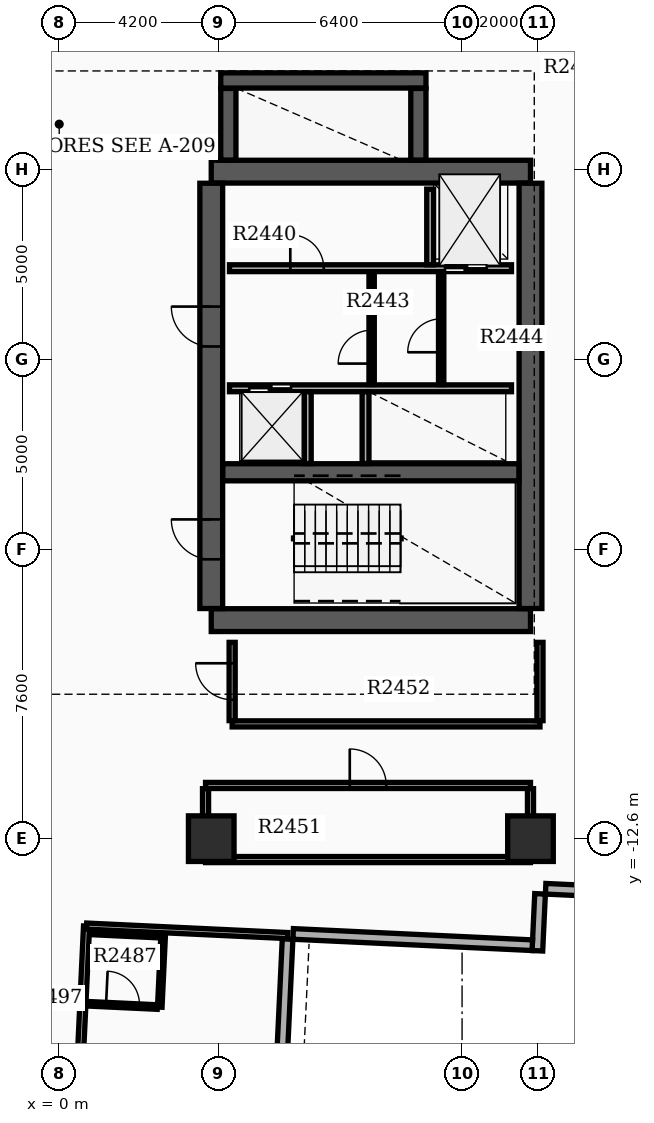
"""IFC4 building model, lengths in metres.
Left out: names, types, materials, properties, quantities, classifications, styles, units other than length and angle.
Written with IfcOpenShell. Run it as: python <this file> out.ifc"""

import sys

from ifc_helpers import new_model, si_unit, direction, frame, frame_2d, origin, origin_2d, place, context, subcontext, project, spatial, rectangle, extrude, element, fill, save


model = new_model("IFC4")
c1 = context("Model", 3, precision=1e-05, world=origin(), true_north=direction((0.0, 1.0)))
c2 = subcontext(c1, "Body", "Model", "MODEL_VIEW")
j1 = project(units=[si_unit("LENGTHUNIT", "METRE"), si_unit("PLANEANGLEUNIT", "RADIAN")], contexts=[c1])
p1 = place(None, origin())
s1 = spatial("IfcSite", under=j1, at=p1, CompositionType="ELEMENT")
p2 = place(p1, origin())
s2 = spatial("IfcBuilding", under=s1, at=p2, CompositionType="ELEMENT")
p3 = place(p2, frame((0.0, 0.0, 156.6)))
s3 = spatial("IfcBuildingStorey", under=s2, at=p3, CompositionType="ELEMENT", Elevation=156.6)
for number, where, z_axis, x_axis in (
    (1, (4.0, -6.85, 0.0), (0.0, 0.0, 1.0), (1.0, 0.0, 0.0)),
    (2, (4.0, 4.95, 0.0), (0.0, 0.0, 1.0), (1.0, 0.0, 0.0)),
):
    element("IfcWall", number, at=place(p3, frame(where, z_axis=z_axis, x_axis=x_axis)), inside=s3, PredefinedType="SHEAR", context=c2, shape_type="SweptSolid", body=[
        extrude(rectangle(XDim=8.4, YDim=0.6, at=frame_2d((4.2, 0.0))), origin(), (0.0, 0.0, 1.0), 3.7),
    ])
p4 = place(p3, frame((4.0, -6.545, 0.0), z_axis=(0.0, 0.0, 1.0), x_axis=(0.0, 1.0, 0.0)))
e3 = element("IfcWall", 3, at=p4, inside=s3, PredefinedType="SHEAR", context=c2, shape_type="SweptSolid", body=[
    extrude(rectangle(XDim=11.19, YDim=0.6, at=frame_2d((5.595, 0.0))), origin(), (0.0, 0.0, 1.0), 3.7),
])
p5 = place(p4, frame((1.295, 0.0, 0.0)))
e4 = element("IfcOpeningElement", 4, at=p5, cuts=e3, PredefinedType="OPENING", context=c2, shape_type="SweptSolid", body=[
    extrude(rectangle(XDim=1.05, YDim=2.15, at=frame_2d((0.525, 1.075))), frame((0.0, 0.31, 0.0), z_axis=(0.0, -1.0, 0.0), x_axis=(1.0, 0.0, 0.0)), (0.0, 0.0, 1.0), 0.62),
])
p6 = place(p4, frame((6.895, 0.0, 0.0)))
e5 = element("IfcOpeningElement", 5, at=p6, cuts=e3, PredefinedType="OPENING", context=c2, shape_type="SweptSolid", body=[
    extrude(rectangle(XDim=1.05, YDim=2.15, at=frame_2d((0.525, 1.075))), frame((0.0, 0.31, 0.0), z_axis=(0.0, -1.0, 0.0), x_axis=(1.0, 0.0, 0.0)), (0.0, 0.0, 1.0), 0.62),
])
p7 = place(p3, frame((12.4, -6.545, 0.0), z_axis=(0.0, 0.0, 1.0), x_axis=(0.0, 1.0, 0.0)))
e6 = element("IfcWall", 6, at=p7, inside=s3, PredefinedType="SHEAR", context=c2, shape_type="SweptSolid", body=[
    extrude(rectangle(XDim=11.19, YDim=0.6, at=frame_2d((5.595, 0.0))), origin(), (0.0, 0.0, 1.0), 3.7),
])
p8 = place(p3, frame((4.305, -2.96, 0.0), z_axis=(0.0, 0.0, 1.0), x_axis=(1.0, 0.0, 0.0)))
e7 = element("IfcWall", 7, at=p8, inside=s3, PredefinedType="SHEAR", context=c2, shape_type="SweptSolid", body=[
    extrude(rectangle(XDim=7.79, YDim=0.45, at=frame_2d((3.895, 0.0))), origin(), (0.0, 0.0, 1.0), 3.7),
])
p9 = place(p3, frame((4.45, 5.255, 0.0), z_axis=(0.0, 0.0, 1.0), x_axis=(0.0, 1.0, 0.0)))
e8 = element("IfcWall", 8, at=p9, inside=s3, PredefinedType="SHEAR", context=c2, shape_type="SweptSolid", body=[
    extrude(rectangle(XDim=1.885, YDim=0.4, at=frame_2d((0.942, 0.0))), origin(), (0.0, 0.0, 1.0), 3.7),
])
p10 = place(p3, frame((4.25, 7.35, 0.0), z_axis=(0.0, 0.0, 1.0), x_axis=(1.0, 0.0, 0.0)))
e9 = element("IfcWall", 9, at=p10, inside=s3, PredefinedType="SHEAR", context=c2, shape_type="SweptSolid", body=[
    extrude(rectangle(XDim=5.4, YDim=0.4, at=frame_2d((2.7, 0.0))), origin(), (0.0, 0.0, 1.0), 3.7),
])
p11 = place(p3, frame((9.45, 5.255, 0.0), z_axis=(0.0, 0.0, 1.0), x_axis=(0.0, 1.0, 0.0)))
e10 = element("IfcWall", 10, at=p11, inside=s3, PredefinedType="SHEAR", context=c2, shape_type="SweptSolid", body=[
    extrude(rectangle(XDim=1.885, YDim=0.4, at=frame_2d((0.942, 0.0))), origin(), (0.0, 0.0, 1.0), 3.7),
])
for number, where, z_axis, x_axis in (
    (11, (12.4, -12.6, 0.0), (0.0, 0.0, 1.0), (1.0, 0.0, 0.0)),
    (12, (4.0, -12.6, 0.0), (0.0, 0.0, 1.0), (1.0, 0.0, 0.0)),
):
    element("IfcColumn", number, at=place(p3, frame(where, z_axis=z_axis, x_axis=x_axis)), inside=s3, PredefinedType="COLUMN", context=c2, shape_type="SweptSolid", body=[
        extrude(rectangle(XDim=1.2, YDim=1.2, at=origin_2d()), origin(), (0.0, 0.0, 1.0), 3.9),
    ])
p12 = place(p3, frame((5.062, -35.318, 0.0), z_axis=(0.0, 0.0, 1.0), x_axis=(0.047103473814, 0.998890015344, 0.0)))
e13 = element("IfcWall", 13, at=p12, inside=s3, PredefinedType="STANDARD", context=c2, shape_type="SweptSolid", body=[
    extrude(rectangle(XDim=20.1, YDim=0.28, at=frame_2d((10.05, 0.0))), origin(), (0.0, 0.0, 1.0), 2.97),
])
p13 = place(p12, frame((1.6, 0.0, 0.8)))
e14 = element("IfcOpeningElement", 14, at=p13, cuts=e13, PredefinedType="OPENING", context=c2, shape_type="SweptSolid", body=[
    extrude(rectangle(XDim=1.2, YDim=1.6, at=frame_2d((0.6, 0.8))), frame((0.0, 0.15, 0.0), z_axis=(0.0, -1.0, 0.0), x_axis=(1.0, 0.0, 0.0)), (0.0, 0.0, 1.0), 0.3),
])
p14 = place(p12, frame((4.8, 0.0, 0.8)))
e15 = element("IfcOpeningElement", 15, at=p14, cuts=e13, PredefinedType="OPENING", context=c2, shape_type="SweptSolid", body=[
    extrude(rectangle(XDim=1.2, YDim=1.6, at=frame_2d((0.6, 0.8))), frame((0.0, 0.15, 0.0), z_axis=(0.0, -1.0, 0.0), x_axis=(1.0, 0.0, 0.0)), (0.0, 0.0, 1.0), 0.3),
])
p15 = place(p12, frame((8.0, 0.0, 0.8)))
e16 = element("IfcOpeningElement", 16, at=p15, cuts=e13, PredefinedType="OPENING", context=c2, shape_type="SweptSolid", body=[
    extrude(rectangle(XDim=1.2, YDim=1.6, at=frame_2d((0.6, 0.8))), frame((0.0, 0.15, 0.0), z_axis=(0.0, -1.0, 0.0), x_axis=(1.0, 0.0, 0.0)), (0.0, 0.0, 1.0), 0.3),
])
p16 = place(p12, frame((11.2, 0.0, 0.8)))
e17 = element("IfcOpeningElement", 17, at=p16, cuts=e13, PredefinedType="OPENING", context=c2, shape_type="SweptSolid", body=[
    extrude(rectangle(XDim=1.2, YDim=1.6, at=frame_2d((0.6, 0.8))), frame((0.0, 0.15, 0.0), z_axis=(0.0, -1.0, 0.0), x_axis=(1.0, 0.0, 0.0)), (0.0, 0.0, 1.0), 0.3),
])
p17 = place(p3, frame((14.017, -13.976, 0.0), z_axis=(0.0, 0.0, 1.0), x_axis=(-0.998883930236, 0.047232339719, 0.0)))
e18 = element("IfcWall", 18, at=p17, inside=s3, PredefinedType="STANDARD", context=c2, shape_type="SweptSolid", body=[
    extrude(rectangle(XDim=1.22, YDim=0.28, at=frame_2d((0.61, 0.0))), origin(), (0.0, 0.0, 1.0), 2.97),
])
p18 = place(p3, frame((12.652, -14.052, 0.0), z_axis=(0.0, 0.0, 1.0), x_axis=(-0.047039284441, -0.99889304018, 0.0)))
e19 = element("IfcWall", 19, at=p18, inside=s3, PredefinedType="STANDARD", context=c2, shape_type="SweptSolid", body=[
    extrude(rectangle(XDim=1.5, YDim=0.28, at=frame_2d((0.75, 0.0))), origin(), (0.0, 0.0, 1.0), 2.97),
])
p19 = place(p3, frame((12.448, -15.404, 0.0), z_axis=(0.0, 0.0, 1.0), x_axis=(-0.998889082162, 0.047123258997, 0.0)))
e20 = element("IfcWall", 20, at=p19, inside=s3, PredefinedType="STANDARD", context=c2, shape_type="SweptSolid", body=[
    extrude(rectangle(XDim=6.3, YDim=0.28, at=frame_2d((3.15, 0.0))), origin(), (0.0, 0.0, 1.0), 2.97),
])
p20 = place(p3, frame((4.48, 2.41, 0.0), z_axis=(0.0, 0.0, 1.0), x_axis=(1.0, 0.0, 0.0)))
e21 = element("IfcWall", 21, at=p20, inside=s3, PredefinedType="SOLIDWALL", context=c2, shape_type="SweptSolid", body=[
    extrude(rectangle(XDim=7.42, YDim=0.18, at=frame_2d((3.71, 0.0))), origin(), (0.0, 0.0, 1.0), 2.96),
])
p21 = place(p20, frame((5.67, 0.0, 0.0)))
e22 = element("IfcOpeningElement", 22, at=p21, cuts=e21, PredefinedType="OPENING", context=c2, shape_type="SweptSolid", body=[
    extrude(rectangle(XDim=1.1, YDim=2.15, at=frame_2d((0.55, 1.075))), frame((0.0, 0.1, 0.0), z_axis=(0.0, -1.0, 0.0), x_axis=(1.0, 0.0, 0.0)), (0.0, 0.0, 1.0), 0.2),
])
p22 = place(p20, frame((1.6, 0.0, 0.0)))
e23 = element("IfcOpeningElement", 23, at=p22, cuts=e21, PredefinedType="OPENING", context=c2, shape_type="SweptSolid", body=[
    extrude(rectangle(XDim=0.88, YDim=2.1, at=frame_2d((0.44, 1.05))), frame((0.0, 0.1, 0.0), z_axis=(0.0, -1.0, 0.0), x_axis=(1.0, 0.0, 0.0)), (0.0, 0.0, 1.0), 0.2),
])
p23 = place(p3, frame((4.48, -0.75, 0.0), z_axis=(0.0, 0.0, 1.0), x_axis=(1.0, 0.0, 0.0)))
e24 = element("IfcWall", 24, at=p23, inside=s3, PredefinedType="SOLIDWALL", context=c2, shape_type="SweptSolid", body=[
    extrude(rectangle(XDim=7.42, YDim=0.18, at=frame_2d((3.71, 0.0))), origin(), (0.0, 0.0, 1.0), 2.96),
])
p24 = place(p23, frame((0.52, 0.0, 0.0)))
e25 = element("IfcOpeningElement", 25, at=p24, cuts=e24, PredefinedType="OPENING", context=c2, shape_type="SweptSolid", body=[
    extrude(rectangle(XDim=1.1, YDim=2.15, at=frame_2d((0.55, 1.075))), frame((0.0, 0.1, 0.0), z_axis=(0.0, -1.0, 0.0), x_axis=(1.0, 0.0, 0.0)), (0.0, 0.0, 1.0), 0.2),
])
p25 = place(p3, frame((9.76, 2.5, 0.0), z_axis=(0.0, 0.0, 1.0), x_axis=(0.0, 1.0, 0.0)))
e26 = element("IfcWall", 26, at=p25, inside=s3, PredefinedType="SOLIDWALL", context=c2, shape_type="SweptSolid", body=[
    extrude(rectangle(XDim=1.99, YDim=0.18, at=frame_2d((0.995, 0.0))), origin(), (0.0, 0.0, 1.0), 2.96),
])
for number, where, z_axis, x_axis in (
    (27, (6.54, -2.73, 0.0), (0.0, 0.0, 1.0), (0.0, 1.0, 0.0)),
    (28, (8.06, -2.73, 0.0), (0.0, 0.0, 1.0), (0.0, 1.0, 0.0)),
):
    element("IfcWall", number, at=place(p3, frame(where, z_axis=z_axis, x_axis=x_axis)), inside=s3, PredefinedType="SOLIDWALL", context=c2, shape_type="SweptSolid", body=[
        extrude(rectangle(XDim=1.89, YDim=0.18, at=frame_2d((0.945, 0.0))), origin(), (0.0, 0.0, 1.0), 2.96),
    ])
p26 = place(p3, frame((8.22, -0.65, 0.0), z_axis=(0.0, 0.0, 1.0), x_axis=(0.0, 1.0, 0.0)))
e29 = element("IfcWall", 29, at=p26, inside=s3, PredefinedType="SOLIDWALL", context=c2, shape_type="SweptSolid", body=[
    extrude(rectangle(XDim=2.96, YDim=0.14, at=frame_2d((1.48, 0.0))), origin(), (0.0, 0.0, 1.0), 2.96),
])
p27 = place(p26, frame((0.55, 0.0, 0.0)))
e30 = element("IfcOpeningElement", 30, at=p27, cuts=e29, PredefinedType="OPENING", context=c2, shape_type="SweptSolid", body=[
    extrude(rectangle(XDim=0.88, YDim=2.1, at=frame_2d((0.44, 1.05))), frame((0.0, 0.08, 0.0), z_axis=(0.0, -1.0, 0.0), x_axis=(1.0, 0.0, 0.0)), (0.0, 0.0, 1.0), 0.16),
])
p28 = place(p3, frame((10.05, -0.652, 0.0), z_axis=(0.0, 0.0, 1.0), x_axis=(0.0, 1.0, 0.0)))
e31 = element("IfcWall", 31, at=p28, inside=s3, PredefinedType="PARTITIONING", context=c2, shape_type="SweptSolid", body=[
    extrude(rectangle(XDim=2.962, YDim=0.14, at=frame_2d((1.481, 0.0))), origin(), (0.0, 0.0, 1.0), 2.96),
])
p29 = place(p28, frame((0.85, 0.0, 0.0)))
e32 = element("IfcOpeningElement", 32, at=p29, cuts=e31, PredefinedType="OPENING", context=c2, shape_type="SweptSolid", body=[
    extrude(rectangle(XDim=0.88, YDim=2.1, at=frame_2d((0.44, 1.05))), frame((0.0, 0.08, 0.0), z_axis=(0.0, -1.0, 0.0), x_axis=(1.0, 0.0, 0.0)), (0.0, 0.0, 1.0), 0.16),
])
p30 = place(p3, frame((3.85, -13.15, 0.0), z_axis=(0.0, 0.0, 1.0), x_axis=(1.0, 0.0, 0.0)))
e33 = element("IfcWall", 33, at=p30, inside=s3, PredefinedType="PARTITIONING", context=c2, shape_type="SweptSolid", body=[
    extrude(rectangle(XDim=8.55, YDim=0.16, at=frame_2d((4.275, 0.0))), origin(), (0.0, 0.0, 1.0), 2.96),
])
p31 = place(p3, frame((3.85, -11.2, 0.0), z_axis=(0.0, 0.0, 1.0), x_axis=(1.0, 0.0, 0.0)))
e34 = element("IfcWall", 34, at=p31, inside=s3, PredefinedType="PARTITIONING", context=c2, shape_type="SweptSolid", body=[
    extrude(rectangle(XDim=8.55, YDim=0.16, at=frame_2d((4.275, 0.0))), origin(), (0.0, 0.0, 1.0), 2.96),
])
p32 = place(p31, frame((3.795, 0.0, 0.0)))
e35 = element("IfcOpeningElement", 35, at=p32, cuts=e34, PredefinedType="OPENING", context=c2, shape_type="SweptSolid", body=[
    extrude(rectangle(XDim=0.96, YDim=2.15, at=frame_2d((0.48, 1.075))), frame((0.0, 0.09, 0.0), z_axis=(0.0, -1.0, 0.0), x_axis=(1.0, 0.0, 0.0)), (0.0, 0.0, 1.0), 0.18),
])
for number, where, z_axis, x_axis in (
    (36, (3.85, -13.065, 0.0), (0.0, 0.0, 1.0), (0.0, 1.0, 0.0)),
    (37, (12.4, -13.065, 0.0), (0.0, 0.0, 1.0), (0.0, 1.0, 0.0)),
):
    element("IfcWall", number, at=place(p3, frame(where, z_axis=z_axis, x_axis=x_axis)), inside=s3, PredefinedType="PARTITIONING", context=c2, shape_type="SweptSolid", body=[
        extrude(rectangle(XDim=1.78, YDim=0.16, at=frame_2d((0.89, 0.0))), origin(), (0.0, 0.0, 1.0), 2.96),
    ])
p33 = place(p3, frame((4.55, -9.58, 0.0), z_axis=(0.0, 0.0, 1.0), x_axis=(1.0, 0.0, 0.0)))
e38 = element("IfcWall", 38, at=p33, inside=s3, PredefinedType="PARTITIONING", context=c2, shape_type="SweptSolid", body=[
    extrude(rectangle(XDim=8.1, YDim=0.16, at=frame_2d((4.05, 0.0))), origin(), (0.0, 0.0, 1.0), 2.96),
])
p34 = place(p3, frame((4.55, -9.495, 0.0), z_axis=(0.0, 0.0, 1.0), x_axis=(0.0, 1.0, 0.0)))
e39 = element("IfcWall", 39, at=p34, inside=s3, PredefinedType="PARTITIONING", context=c2, shape_type="SweptSolid", body=[
    extrude(rectangle(XDim=2.06, YDim=0.16, at=frame_2d((1.03, 0.0))), origin(), (0.0, 0.0, 1.0), 2.96),
])
p35 = place(p34, frame((0.55, 0.0, 0.0)))
e40 = element("IfcOpeningElement", 40, at=p35, cuts=e39, PredefinedType="OPENING", context=c2, shape_type="SweptSolid", body=[
    extrude(rectangle(XDim=0.96, YDim=2.15, at=frame_2d((0.48, 1.075))), frame((0.0, 0.09, 0.0), z_axis=(0.0, -1.0, 0.0), x_axis=(1.0, 0.0, 0.0)), (0.0, 0.0, 1.0), 0.18),
])
p36 = place(p3, frame((12.65, -9.495, 0.0), z_axis=(0.0, 0.0, 1.0), x_axis=(0.0, 1.0, 0.0)))
e41 = element("IfcWall", 41, at=p36, inside=s3, PredefinedType="PARTITIONING", context=c2, shape_type="SweptSolid", body=[
    extrude(rectangle(XDim=2.06, YDim=0.16, at=frame_2d((1.03, 0.0))), origin(), (0.0, 0.0, 1.0), 2.96),
])
p37 = place(p3, frame((0.719, -14.9, 0.0), z_axis=(0.0, 0.0, 1.0), x_axis=(-0.047105352469, -0.998889926753, 0.0)))
e42 = element("IfcWall", 42, at=p37, inside=s3, PredefinedType="PARTITIONING", context=c2, shape_type="SweptSolid", body=[
    extrude(rectangle(XDim=20.182, YDim=0.16, at=frame_2d((10.091, 0.0))), origin(), (0.0, 0.0, 1.0), 2.96),
])
p38 = place(p37, frame((8.212, 0.0, 0.0)))
e43 = element("IfcOpeningElement", 43, at=p38, cuts=e42, PredefinedType="OPENING", context=c2, shape_type="SweptSolid", body=[
    extrude(rectangle(XDim=0.96, YDim=2.15, at=frame_2d((0.48, 1.075))), frame((0.0, 0.09, 0.0), z_axis=(0.0, -1.0, 0.0), x_axis=(1.0, 0.0, 0.0)), (0.0, 0.0, 1.0), 0.18),
])
p39 = place(p37, frame((16.261, 0.0, 0.0)))
e44 = element("IfcOpeningElement", 44, at=p39, cuts=e42, PredefinedType="OPENING", context=c2, shape_type="SweptSolid", body=[
    extrude(rectangle(XDim=0.96, YDim=2.15, at=frame_2d((0.48, 1.075))), frame((0.0, 0.09, 0.0), z_axis=(0.0, -1.0, 0.0), x_axis=(1.0, 0.0, 0.0)), (0.0, 0.0, 1.0), 0.18),
])
p40 = place(p3, frame((0.719, -14.9, 0.0), z_axis=(0.0, 0.0, 1.0), x_axis=(0.998888989288, -0.047125227635, 0.0)))
e45 = element("IfcWall", 45, at=p40, inside=s3, PredefinedType="PARTITIONING", context=c2, shape_type="SweptSolid", body=[
    extrude(rectangle(XDim=5.3, YDim=0.16, at=frame_2d((2.65, 0.0))), origin(), (0.0, 0.0, 1.0), 2.96),
])
p41 = place(p3, frame((0.763, -16.945, 0.0), z_axis=(0.0, 0.0, 1.0), x_axis=(0.998884467853, -0.047220968666, 0.0)))
e46 = element("IfcWall", 46, at=p41, inside=s3, PredefinedType="PARTITIONING", context=c2, shape_type="SweptSolid", body=[
    extrude(rectangle(XDim=1.82, YDim=0.12, at=frame_2d((0.91, 0.0))), origin(), (0.0, 0.0, 1.0), 2.96),
])
p42 = place(p41, frame((0.47, 0.0, 0.0)))
e47 = element("IfcOpeningElement", 47, at=p42, cuts=e46, PredefinedType="OPENING", context=c2, shape_type="SweptSolid", body=[
    extrude(rectangle(XDim=0.88, YDim=2.1, at=frame_2d((0.44, 1.05))), frame((0.0, 0.07, 0.0), z_axis=(0.0, -1.0, 0.0), x_axis=(1.0, 0.0, 0.0)), (0.0, 0.0, 1.0), 0.14),
])
p43 = place(p3, frame((0.851, -15.067, 0.0), z_axis=(0.0, 0.0, 1.0), x_axis=(0.998890786574, -0.047087116047, 0.0)))
e48 = element("IfcWall", 48, at=p43, inside=s3, PredefinedType="PARTITIONING", context=c2, shape_type="SweptSolid", body=[
    extrude(rectangle(XDim=1.82, YDim=0.12, at=frame_2d((0.91, 0.0))), origin(), (0.0, 0.0, 1.0), 2.96),
])
p44 = place(p3, frame((2.734, -15.156, 0.0), z_axis=(0.0, 0.0, 1.0), x_axis=(-0.047139425368, -0.998888319371, 0.0)))
e49 = element("IfcWall", 49, at=p44, inside=s3, PredefinedType="PARTITIONING", context=c2, shape_type="SweptSolid", body=[
    extrude(rectangle(XDim=1.88, YDim=0.12, at=frame_2d((0.94, 0.0))), origin(), (0.0, 0.0, 1.0), 2.96),
])
p45 = place(p5, origin())
e50 = element("IfcDoor", 50, at=p45, inside=s3, OperationType="SINGLE_SWING_RIGHT", PredefinedType="DOOR", context=c2, shape_type="SweptSolid", body=[
    extrude(rectangle(XDim=1.05, YDim=2.15, at=frame_2d((0.525, 1.075))), frame((0.0, 0.025, 0.0), z_axis=(0.0, -1.0, 0.0), x_axis=(1.0, 0.0, 0.0)), (0.0, 0.0, 1.0), 0.05),
])
fill(e4, e50)
p46 = place(p6, origin())
e51 = element("IfcDoor", 51, at=p46, inside=s3, OperationType="SINGLE_SWING_RIGHT", PredefinedType="DOOR", context=c2, shape_type="SweptSolid", body=[
    extrude(rectangle(XDim=1.05, YDim=2.15, at=frame_2d((0.525, 1.075))), frame((0.0, 0.025, 0.0), z_axis=(0.0, -1.0, 0.0), x_axis=(1.0, 0.0, 0.0)), (0.0, 0.0, 1.0), 0.05),
])
fill(e5, e51)
p47 = place(p21, origin())
e52 = element("IfcDoor", 52, at=p47, inside=s3, OperationType="DOUBLE_DOOR_SLIDING", PredefinedType="DOOR", context=c2, shape_type="SweptSolid", body=[
    extrude(rectangle(XDim=1.1, YDim=2.15, at=frame_2d((0.55, 1.075))), frame((0.0, 0.025, 0.0), z_axis=(0.0, -1.0, 0.0), x_axis=(1.0, 0.0, 0.0)), (0.0, 0.0, 1.0), 0.05),
])
fill(e22, e52)
p48 = place(p24, origin())
e53 = element("IfcDoor", 53, at=p48, inside=s3, OperationType="DOUBLE_DOOR_SLIDING", PredefinedType="DOOR", context=c2, shape_type="SweptSolid", body=[
    extrude(rectangle(XDim=1.1, YDim=2.15, at=frame_2d((0.55, 1.075))), frame((0.0, 0.025, 0.0), z_axis=(0.0, -1.0, 0.0), x_axis=(1.0, 0.0, 0.0)), (0.0, 0.0, 1.0), 0.05),
])
fill(e25, e53)
p49 = place(p22, origin())
e54 = element("IfcDoor", 54, at=p49, inside=s3, OperationType="SINGLE_SWING_LEFT", PredefinedType="DOOR", context=c2, shape_type="SweptSolid", body=[
    extrude(rectangle(XDim=0.88, YDim=2.1, at=frame_2d((0.44, 1.05))), frame((0.0, 0.025, 0.0), z_axis=(0.0, -1.0, 0.0), x_axis=(1.0, 0.0, 0.0)), (0.0, 0.0, 1.0), 0.05),
])
fill(e23, e54)
p50 = place(p27, origin())
e55 = element("IfcDoor", 55, at=p50, inside=s3, OperationType="SINGLE_SWING_LEFT", PredefinedType="DOOR", context=c2, shape_type="SweptSolid", body=[
    extrude(rectangle(XDim=0.88, YDim=2.1, at=frame_2d((0.44, 1.05))), frame((0.0, 0.025, 0.0), z_axis=(0.0, -1.0, 0.0), x_axis=(1.0, 0.0, 0.0)), (0.0, 0.0, 1.0), 0.05),
])
fill(e30, e55)
p51 = place(p29, origin())
e56 = element("IfcDoor", 56, at=p51, inside=s3, OperationType="SINGLE_SWING_LEFT", PredefinedType="DOOR", context=c2, shape_type="SweptSolid", body=[
    extrude(rectangle(XDim=0.88, YDim=2.1, at=frame_2d((0.44, 1.05))), frame((0.0, 0.025, 0.0), z_axis=(0.0, -1.0, 0.0), x_axis=(1.0, 0.0, 0.0)), (0.0, 0.0, 1.0), 0.05),
])
fill(e32, e56)
p52 = place(p32, origin())
e57 = element("IfcDoor", 57, at=p52, inside=s3, OperationType="SINGLE_SWING_LEFT", PredefinedType="DOOR", context=c2, shape_type="SweptSolid", body=[
    extrude(rectangle(XDim=0.96, YDim=2.15, at=frame_2d((0.48, 1.075))), frame((0.0, 0.025, 0.0), z_axis=(0.0, -1.0, 0.0), x_axis=(1.0, 0.0, 0.0)), (0.0, 0.0, 1.0), 0.05),
])
fill(e35, e57)
p53 = place(p35, origin())
e58 = element("IfcDoor", 58, at=p53, inside=s3, OperationType="SINGLE_SWING_RIGHT", PredefinedType="DOOR", context=c2, shape_type="SweptSolid", body=[
    extrude(rectangle(XDim=0.96, YDim=2.15, at=frame_2d((0.48, 1.075))), frame((0.0, 0.025, 0.0), z_axis=(0.0, -1.0, 0.0), x_axis=(1.0, 0.0, 0.0)), (0.0, 0.0, 1.0), 0.05),
])
fill(e40, e58)
p54 = place(p42, origin())
e59 = element("IfcDoor", 59, at=p54, inside=s3, OperationType="SINGLE_SWING_LEFT", PredefinedType="DOOR", context=c2, shape_type="SweptSolid", body=[
    extrude(rectangle(XDim=0.88, YDim=2.1, at=frame_2d((0.44, 1.05))), frame((0.0, 0.025, 0.0), z_axis=(0.0, -1.0, 0.0), x_axis=(1.0, 0.0, 0.0)), (0.0, 0.0, 1.0), 0.05),
])
fill(e47, e59)
save(model, sys.argv[1])
